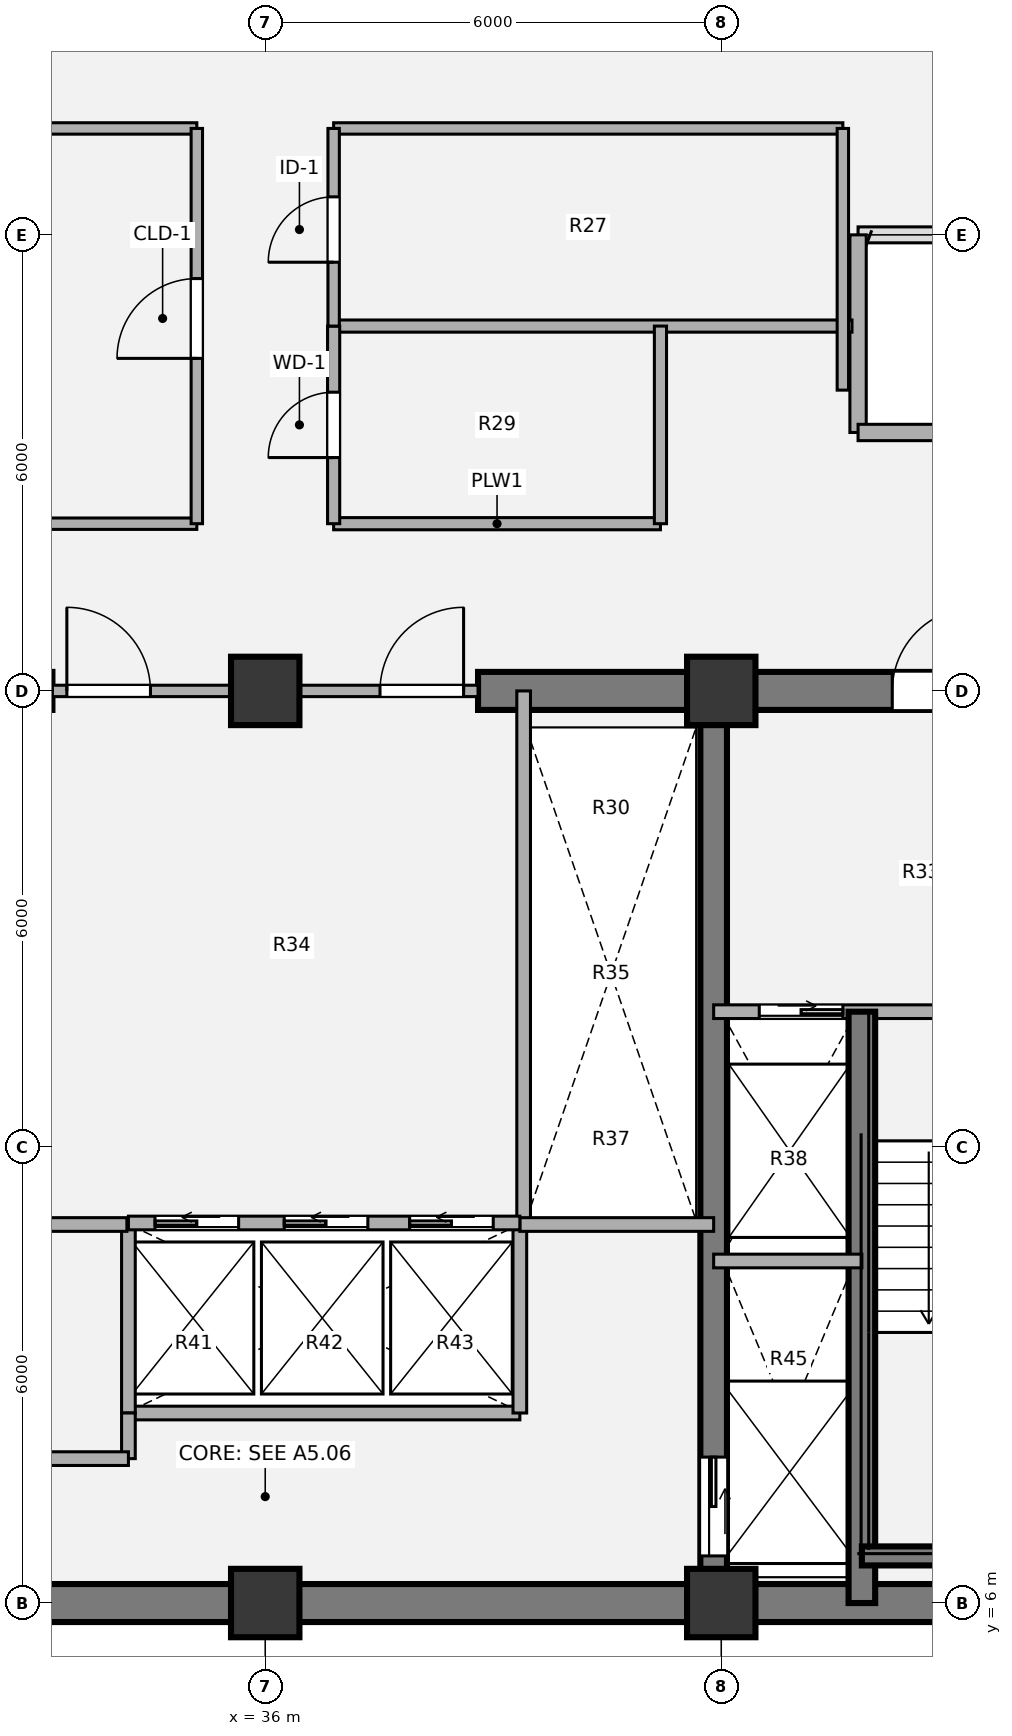
"""IFC4 building model, lengths in metres.
Left out: names, types, materials, properties, quantities, classifications, styles, units other than length and angle.
Written with IfcOpenShell. Run it as: python <this file> out.ifc"""

import sys

from ifc_helpers import new_model, si_unit, direction, frame, frame_2d, origin, origin_2d, place, context, subcontext, project, spatial, rectangle, extrude, source, transform, mapped, element, fill, save


model = new_model("IFC4")
c1 = context("Model", 3, precision=1e-05, world=origin(), true_north=direction((0.0, 1.0)))
c2 = subcontext(c1, "Body", "Model", "MODEL_VIEW")
j1 = project(units=[si_unit("LENGTHUNIT", "METRE"), si_unit("PLANEANGLEUNIT", "RADIAN")], contexts=[c1])
p1 = place(None, origin())
s1 = spatial("IfcSite", under=j1, at=p1, CompositionType="ELEMENT")
p2 = place(p1, origin())
s2 = spatial("IfcBuilding", under=s1, at=p2, CompositionType="ELEMENT")
p3 = place(p2, frame((0.0, 0.0, 127.62)))
s3 = spatial("IfcBuildingStorey", under=s2, at=p3, CompositionType="ELEMENT", Elevation=127.62)
m1 = source(origin(), c2, "Body", "SweptSolid", [
    extrude(rectangle(XDim=0.9, YDim=0.9, at=origin_2d()), origin(), (0.0, 0.0, 1.0), 3.78),
])
for number, where, z_axis, x_axis in (
    (1, (36.0, 6.0, 0.0), (0.0, 0.0, 1.0), (1.0, 0.0, 0.0)),
    (2, (42.0, 6.0, 0.0), (0.0, 0.0, 1.0), (1.0, 0.0, 0.0)),
    (3, (36.0, 18.0, 0.0), (0.0, 0.0, 1.0), (1.0, 0.0, 0.0)),
    (4, (42.0, 18.0, 0.0), (0.0, 0.0, 1.0), (1.0, 0.0, 0.0)),
):
    element("IfcColumn", number, at=place(p3, frame(where, z_axis=z_axis, x_axis=x_axis)), inside=s3, PredefinedType="COLUMN", context=c2, shape_type="MappedRepresentation", body=[
        mapped(m1, transform((0.0, 0.0, 0.0), x_axis=(1.0, 0.0, 0.0), y_axis=(0.0, 1.0, 0.0), z_axis=(0.0, 0.0, 1.0), scale=1.0)),
    ])
p4 = place(p3, frame((48.25, 6.0, 0.0), z_axis=(0.0, 0.0, 1.0), x_axis=(-1.0, 0.0, 0.0)))
e5 = element("IfcWall", 5, at=p4, inside=s3, PredefinedType="SHEAR", context=c2, shape_type="SweptSolid", body=[
    extrude(rectangle(XDim=24.5, YDim=0.5, at=frame_2d((12.25, 0.0))), origin(), (0.0, 0.0, 1.0), 3.78),
])
p5 = place(p3, frame((23.75, 18.0, 0.0), z_axis=(0.0, 0.0, 1.0), x_axis=(1.0, 0.0, 0.0)))
e6 = element("IfcWall", 6, at=p5, inside=s3, PredefinedType="SHEAR", context=c2, shape_type="SweptSolid", body=[
    extrude(rectangle(XDim=9.45, YDim=0.5, at=frame_2d((4.725, 0.0))), origin(), (0.0, 0.0, 1.0), 3.78),
])
p6 = place(p5, frame((2.95, 0.0, 0.0)))
e7 = element("IfcOpeningElement", 7, at=p6, cuts=e6, PredefinedType="OPENING", context=c2, shape_type="SweptSolid", body=[
    extrude(rectangle(XDim=1.1, YDim=2.1, at=origin_2d()), frame((0.55, 0.26, 1.05), z_axis=(0.0, -1.0, 0.0), x_axis=(1.0, 0.0, 0.0)), (0.0, 0.0, 1.0), 0.52),
])
p7 = place(p3, frame((38.8, 18.0, 0.0), z_axis=(0.0, 0.0, 1.0), x_axis=(1.0, 0.0, 0.0)))
e8 = element("IfcWall", 8, at=p7, inside=s3, PredefinedType="SHEAR", context=c2, shape_type="SweptSolid", body=[
    extrude(rectangle(XDim=9.45, YDim=0.5, at=frame_2d((4.725, 0.0))), origin(), (0.0, 0.0, 1.0), 3.78),
])
p8 = place(p7, frame((5.45, 0.0, 0.0)))
e9 = element("IfcOpeningElement", 9, at=p8, cuts=e8, PredefinedType="OPENING", context=c2, shape_type="SweptSolid", body=[
    extrude(rectangle(XDim=1.1, YDim=2.1, at=origin_2d()), frame((0.55, 0.26, 1.05), z_axis=(0.0, -1.0, 0.0), x_axis=(1.0, 0.0, 0.0)), (0.0, 0.0, 1.0), 0.52),
])
p9 = place(p3, frame((41.9, 18.0, 0.0), z_axis=(0.0, 0.0, 1.0), x_axis=(0.0, -1.0, 0.0)))
e10 = element("IfcWall", 10, at=p9, inside=s3, PredefinedType="SHEAR", context=c2, shape_type="SweptSolid", body=[
    extrude(rectangle(XDim=12.0, YDim=0.35, at=frame_2d((6.0, 0.0))), origin(), (0.0, 0.0, 1.0), 3.78),
])
p10 = place(p9, frame((10.08, 0.0, 0.0)))
e11 = element("IfcOpeningElement", 11, at=p10, cuts=e10, PredefinedType="OPENING", context=c2, shape_type="SweptSolid", body=[
    extrude(rectangle(XDim=1.3, YDim=2.1, at=origin_2d()), frame((0.65, 0.185, 1.05), z_axis=(0.0, -1.0, 0.0), x_axis=(1.0, 0.0, 0.0)), (0.0, 0.0, 1.0), 0.37),
])
p11 = place(p3, frame((43.8, 24.0, 0.0), z_axis=(0.0, 0.0, 1.0), x_axis=(0.0, -1.0, 0.0)))
e12 = element("IfcWall", 12, at=p11, inside=s3, PredefinedType="SOLIDWALL", context=c2, shape_type="SweptSolid", body=[
    extrude(rectangle(XDim=2.6, YDim=0.215, at=frame_2d((1.3, 0.0))), origin(), (0.0, 0.0, 1.0), 3.53),
])
p12 = place(p3, frame((43.8, 21.4, 0.0), z_axis=(0.0, 0.0, 1.0), x_axis=(1.0, 0.0, 0.0)))
e13 = element("IfcWall", 13, at=p12, inside=s3, PredefinedType="SOLIDWALL", context=c2, shape_type="SweptSolid", body=[
    extrude(rectangle(XDim=3.85, YDim=0.215, at=frame_2d((1.925, 0.0))), origin(), (0.0, 0.0, 1.0), 3.53),
])
p13 = place(p3, frame((34.2, 8.5, 0.0), z_axis=(0.0, 0.0, 1.0), x_axis=(1.0, 0.0, 0.0)))
e14 = element("IfcWall", 14, at=p13, inside=s3, PredefinedType="PARTITIONING", context=c2, shape_type="SweptSolid", body=[
    extrude(rectangle(XDim=5.15, YDim=0.18, at=frame_2d((2.575, 0.0))), origin(), (0.0, 0.0, 1.0), 3.5),
])
for number, where, z_axis, x_axis in (
    (15, (34.2, 8.5, 0.0), (0.0, 0.0, 1.0), (0.0, 1.0, 0.0)),
    (16, (39.35, 8.5, 0.0), (0.0, 0.0, 1.0), (0.0, 1.0, 0.0)),
):
    element("IfcWall", number, at=place(p3, frame(where, z_axis=z_axis, x_axis=x_axis)), inside=s3, PredefinedType="PARTITIONING", context=c2, shape_type="SweptSolid", body=[
        extrude(rectangle(XDim=2.5, YDim=0.18, at=frame_2d((1.25, 0.0))), origin(), (0.0, 0.0, 1.0), 3.5),
    ])
p14 = place(p3, frame((39.4, 11.0, 0.0), z_axis=(0.0, 0.0, 1.0), x_axis=(0.0, 1.0, 0.0)))
e17 = element("IfcWall", 17, at=p14, inside=s3, PredefinedType="PARTITIONING", context=c2, shape_type="SweptSolid", body=[
    extrude(rectangle(XDim=7.0, YDim=0.18, at=frame_2d((3.5, 0.0))), origin(), (0.0, 0.0, 1.0), 3.5),
])
p15 = place(p3, frame((30.1, 10.98, 0.0), z_axis=(0.0, 0.0, 1.0), x_axis=(1.0, 0.0, 0.0)))
e18 = element("IfcWall", 18, at=p15, inside=s3, PredefinedType="PARTITIONING", context=c2, shape_type="SweptSolid", body=[
    extrude(rectangle(XDim=4.08, YDim=0.18, at=frame_2d((2.04, 0.0))), origin(), (0.0, 0.0, 1.0), 3.5),
])
p16 = place(p3, frame((34.2, 7.9, 0.0), z_axis=(0.0, 0.0, 1.0), x_axis=(0.0, 1.0, 0.0)))
e19 = element("IfcWall", 19, at=p16, inside=s3, PredefinedType="PARTITIONING", context=c2, shape_type="SweptSolid", body=[
    extrude(rectangle(XDim=0.6, YDim=0.18, at=frame_2d((0.3, 0.0))), origin(), (0.0, 0.0, 1.0), 3.5),
])
p17 = place(p3, frame((32.6, 7.9, 0.0), z_axis=(0.0, 0.0, 1.0), x_axis=(1.0, 0.0, 0.0)))
e20 = element("IfcWall", 20, at=p17, inside=s3, PredefinedType="PARTITIONING", context=c2, shape_type="SweptSolid", body=[
    extrude(rectangle(XDim=1.6, YDim=0.18, at=frame_2d((0.8, 0.0))), origin(), (0.0, 0.0, 1.0), 3.5),
])
p18 = place(p3, frame((39.35, 10.98, 0.0), z_axis=(0.0, 0.0, 1.0), x_axis=(1.0, 0.0, 0.0)))
e21 = element("IfcWall", 21, at=p18, inside=s3, PredefinedType="PARTITIONING", context=c2, shape_type="SweptSolid", body=[
    extrude(rectangle(XDim=2.55, YDim=0.18, at=frame_2d((1.275, 0.0))), origin(), (0.0, 0.0, 1.0), 3.5),
])
p19 = place(p3, frame((33.2, 18.0, 0.0), z_axis=(0.0, 0.0, 1.0), x_axis=(1.0, 0.0, 0.0)))
e22 = element("IfcWall", 22, at=p19, inside=s3, PredefinedType="PARTITIONING", context=c2, shape_type="SweptSolid", body=[
    extrude(rectangle(XDim=5.6, YDim=0.15, at=frame_2d((2.8, 0.0))), origin(), (0.0, 0.0, 1.0), 2.315),
])
p20 = place(p19, frame((0.19, 0.0, 0.0)))
e23 = element("IfcOpeningElement", 23, at=p20, cuts=e22, PredefinedType="OPENING", context=c2, shape_type="SweptSolid", body=[
    extrude(rectangle(XDim=1.1, YDim=2.1, at=origin_2d()), frame((0.55, 0.085, 1.05), z_axis=(0.0, -1.0, 0.0), x_axis=(1.0, 0.0, 0.0)), (0.0, 0.0, 1.0), 0.17),
])
p21 = place(p19, frame((4.31, 0.0, 0.0)))
e24 = element("IfcOpeningElement", 24, at=p21, cuts=e22, PredefinedType="OPENING", context=c2, shape_type="SweptSolid", body=[
    extrude(rectangle(XDim=1.1, YDim=2.1, at=origin_2d()), frame((0.55, 0.085, 1.05), z_axis=(0.0, -1.0, 0.0), x_axis=(1.0, 0.0, 0.0)), (0.0, 0.0, 1.0), 0.17),
])
p22 = place(p3, frame((41.9, 13.78, 0.0), z_axis=(0.0, 0.0, 1.0), x_axis=(1.0, 0.0, 0.0)))
e25 = element("IfcWall", 25, at=p22, inside=s3, PredefinedType="PARTITIONING", context=c2, shape_type="SweptSolid", body=[
    extrude(rectangle(XDim=6.1, YDim=0.18, at=frame_2d((3.05, 0.0))), origin(), (0.0, 0.0, 1.0), 3.5),
])
p23 = place(p22, frame((0.6, 0.0, 0.0)))
e26 = element("IfcOpeningElement", 26, at=p23, cuts=e25, PredefinedType="OPENING", context=c2, shape_type="SweptSolid", body=[
    extrude(rectangle(XDim=1.1, YDim=2.1, at=origin_2d()), frame((0.55, 0.1, 1.05), z_axis=(0.0, -1.0, 0.0), x_axis=(1.0, 0.0, 0.0)), (0.0, 0.0, 1.0), 0.2),
])
p24 = place(p22, frame((3.8, 0.0, 0.0)))
e27 = element("IfcOpeningElement", 27, at=p24, cuts=e25, PredefinedType="OPENING", context=c2, shape_type="SweptSolid", body=[
    extrude(rectangle(XDim=1.1, YDim=2.1, at=origin_2d()), frame((0.55, 0.1, 1.05), z_axis=(0.0, -1.0, 0.0), x_axis=(1.0, 0.0, 0.0)), (0.0, 0.0, 1.0), 0.2),
])
p25 = place(p3, frame((43.85, 6.0, 0.0), z_axis=(0.0, 0.0, 1.0), x_axis=(0.0, 1.0, 0.0)))
e28 = element("IfcWall", 28, at=p25, inside=s3, PredefinedType="SHEAR", context=c2, shape_type="SweptSolid", body=[
    extrude(rectangle(XDim=7.78, YDim=0.35, at=frame_2d((3.89, 0.0))), origin(), (0.0, 0.0, 1.0), 3.85),
])
p26 = place(p3, frame((43.85, 6.62, 0.0), z_axis=(0.0, 0.0, 1.0), x_axis=(1.0, 0.0, 0.0)))
e29 = element("IfcWall", 29, at=p26, inside=s3, PredefinedType="SHEAR", context=c2, shape_type="SweptSolid", body=[
    extrude(rectangle(XDim=3.57, YDim=0.25, at=frame_2d((1.785, 0.0))), origin(), (0.0, 0.0, 1.0), 3.85),
])
p27 = place(p3, frame((41.9, 10.5, 0.0), z_axis=(0.0, 0.0, 1.0), x_axis=(1.0, 0.0, 0.0)))
e30 = element("IfcWall", 30, at=p27, inside=s3, PredefinedType="PARTITIONING", context=c2, shape_type="SweptSolid", body=[
    extrude(rectangle(XDim=1.95, YDim=0.18, at=frame_2d((0.975, 0.0))), origin(), (0.0, 0.0, 1.0), 3.5),
])
p28 = place(p3, frame((34.2, 11.0, 0.0), z_axis=(0.0, 0.0, 1.0), x_axis=(1.0, 0.0, 0.0)))
e31 = element("IfcWall", 31, at=p28, inside=s3, PredefinedType="PARTITIONING", context=c2, shape_type="SweptSolid", body=[
    extrude(rectangle(XDim=5.15, YDim=0.18, at=frame_2d((2.575, 0.0))), origin(), (0.0, 0.0, 1.0), 3.5),
])
p29 = place(p28, frame((0.35, 0.0, 0.0)))
e32 = element("IfcOpeningElement", 32, at=p29, cuts=e31, PredefinedType="OPENING", context=c2, shape_type="SweptSolid", body=[
    extrude(rectangle(XDim=1.1, YDim=2.1, at=origin_2d()), frame((0.55, 0.1, 1.05), z_axis=(0.0, -1.0, 0.0), x_axis=(1.0, 0.0, 0.0)), (0.0, 0.0, 1.0), 0.2),
])
p30 = place(p28, frame((2.05, 0.0, 0.0)))
e33 = element("IfcOpeningElement", 33, at=p30, cuts=e31, PredefinedType="OPENING", context=c2, shape_type="SweptSolid", body=[
    extrude(rectangle(XDim=1.1, YDim=2.1, at=origin_2d()), frame((0.55, 0.1, 1.05), z_axis=(0.0, -1.0, 0.0), x_axis=(1.0, 0.0, 0.0)), (0.0, 0.0, 1.0), 0.2),
])
p31 = place(p28, frame((3.7, 0.0, 0.0)))
e34 = element("IfcOpeningElement", 34, at=p31, cuts=e31, PredefinedType="OPENING", context=c2, shape_type="SweptSolid", body=[
    extrude(rectangle(XDim=1.1, YDim=2.1, at=origin_2d()), frame((0.55, 0.1, 1.05), z_axis=(0.0, -1.0, 0.0), x_axis=(1.0, 0.0, 0.0)), (0.0, 0.0, 1.0), 0.2),
])
p32 = place(p3, frame((28.4, 20.2, 0.0), z_axis=(0.0, 0.0, 1.0), x_axis=(1.0, 0.0, 0.0)))
e35 = element("IfcWall", 35, at=p32, inside=s3, PredefinedType="PARTITIONING", context=c2, shape_type="SweptSolid", body=[
    extrude(rectangle(XDim=6.7, YDim=0.15, at=frame_2d((3.35, 0.0))), origin(), (0.0, 0.0, 1.0), 3.5),
])
p33 = place(p3, frame((36.9, 20.2, 0.0), z_axis=(0.0, 0.0, 1.0), x_axis=(1.0, 0.0, 0.0)))
e36 = element("IfcWall", 36, at=p33, inside=s3, PredefinedType="PLUMBINGWALL", context=c2, shape_type="SweptSolid", body=[
    extrude(rectangle(XDim=4.3, YDim=0.16, at=frame_2d((2.15, 0.0))), origin(), (0.0, 0.0, 1.0), 3.5),
])
p34 = place(p3, frame((36.9, 22.8, 0.0), z_axis=(0.0, 0.0, 1.0), x_axis=(1.0, 0.0, 0.0)))
e37 = element("IfcWall", 37, at=p34, inside=s3, PredefinedType="PLUMBINGWALL", context=c2, shape_type="SweptSolid", body=[
    extrude(rectangle(XDim=6.82, YDim=0.16, at=frame_2d((3.41, 0.0))), origin(), (0.0, 0.0, 1.0), 3.5),
])
for number, where, z_axis, x_axis in (
    (38, (28.4, 25.4, 0.0), (0.0, 0.0, 1.0), (1.0, 0.0, 0.0)),
    (39, (36.9, 25.4, 0.0), (0.0, 0.0, 1.0), (1.0, 0.0, 0.0)),
):
    element("IfcWall", number, at=place(p3, frame(where, z_axis=z_axis, x_axis=x_axis)), inside=s3, PredefinedType="PARTITIONING", context=c2, shape_type="SweptSolid", body=[
        extrude(rectangle(XDim=6.7, YDim=0.15, at=frame_2d((3.35, 0.0))), origin(), (0.0, 0.0, 1.0), 3.5),
    ])
p35 = place(p3, frame((35.1, 20.2, 0.0), z_axis=(0.0, 0.0, 1.0), x_axis=(0.0, 1.0, 0.0)))
e40 = element("IfcWall", 40, at=p35, inside=s3, PredefinedType="PARTITIONING", context=c2, shape_type="SweptSolid", body=[
    extrude(rectangle(XDim=5.2, YDim=0.15, at=frame_2d((2.6, 0.0))), origin(), (0.0, 0.0, 1.0), 3.5),
])
p36 = place(p35, frame((2.175, 0.0, 0.0)))
e41 = element("IfcOpeningElement", 41, at=p36, cuts=e40, PredefinedType="OPENING", context=c2, shape_type="SweptSolid", body=[
    extrude(rectangle(XDim=1.05, YDim=2.1, at=origin_2d()), frame((0.525, 0.085, 1.05), z_axis=(0.0, -1.0, 0.0), x_axis=(1.0, 0.0, 0.0)), (0.0, 0.0, 1.0), 0.17),
])
p37 = place(p3, frame((36.9, 20.2, 0.0), z_axis=(0.0, 0.0, 1.0), x_axis=(0.0, 1.0, 0.0)))
e42 = element("IfcWall", 42, at=p37, inside=s3, PredefinedType="PLUMBINGWALL", context=c2, shape_type="SweptSolid", body=[
    extrude(rectangle(XDim=2.6, YDim=0.16, at=frame_2d((1.3, 0.0))), origin(), (0.0, 0.0, 1.0), 3.5),
])
p38 = place(p37, frame((0.87, 0.0, 0.0)))
e43 = element("IfcOpeningElement", 43, at=p38, cuts=e42, PredefinedType="OPENING", context=c2, shape_type="SweptSolid", body=[
    extrude(rectangle(XDim=0.86, YDim=2.1, at=origin_2d()), frame((0.43, 0.09, 1.05), z_axis=(0.0, -1.0, 0.0), x_axis=(1.0, 0.0, 0.0)), (0.0, 0.0, 1.0), 0.18),
])
p39 = place(p3, frame((36.9, 22.8, 0.0), z_axis=(0.0, 0.0, 1.0), x_axis=(0.0, 1.0, 0.0)))
e44 = element("IfcWall", 44, at=p39, inside=s3, PredefinedType="PARTITIONING", context=c2, shape_type="SweptSolid", body=[
    extrude(rectangle(XDim=2.6, YDim=0.15, at=frame_2d((1.3, 0.0))), origin(), (0.0, 0.0, 1.0), 3.5),
])
p40 = place(p39, frame((0.84, 0.0, 0.0)))
e45 = element("IfcOpeningElement", 45, at=p40, cuts=e44, PredefinedType="OPENING", context=c2, shape_type="SweptSolid", body=[
    extrude(rectangle(XDim=0.86, YDim=2.1, at=origin_2d()), frame((0.43, 0.085, 1.05), z_axis=(0.0, -1.0, 0.0), x_axis=(1.0, 0.0, 0.0)), (0.0, 0.0, 1.0), 0.17),
])
p41 = place(p3, frame((41.2, 20.2, 0.0), z_axis=(0.0, 0.0, 1.0), x_axis=(0.0, 1.0, 0.0)))
e46 = element("IfcWall", 46, at=p41, inside=s3, PredefinedType="PLUMBINGWALL", context=c2, shape_type="SweptSolid", body=[
    extrude(rectangle(XDim=2.6, YDim=0.16, at=frame_2d((1.3, 0.0))), origin(), (0.0, 0.0, 1.0), 2.815),
])
p42 = place(p3, frame((43.6, 21.958, 0.0), z_axis=(0.0, 0.0, 1.0), x_axis=(0.0, 1.0, 0.0)))
e47 = element("IfcWall", 47, at=p42, inside=s3, PredefinedType="PARTITIONING", context=c2, shape_type="SweptSolid", body=[
    extrude(rectangle(XDim=3.442, YDim=0.15, at=frame_2d((1.721, 0.0))), origin(), (0.0, 0.0, 1.0), 3.5),
])
m2 = source(origin(), c2, "Body", "SweptSolid", [
    extrude(rectangle(XDim=1.1, YDim=2.1, at=origin_2d()), frame((0.55, 0.025, 1.05), z_axis=(0.0, -1.0, 0.0), x_axis=(1.0, 0.0, 0.0)), (0.0, 0.0, 1.0), 0.05),
])
p43 = place(p20, origin())
e48 = element("IfcDoor", 48, at=p43, inside=s3, OperationType="SINGLE_SWING_LEFT", PredefinedType="DOOR", context=c2, shape_type="MappedRepresentation", body=[
    mapped(m2, transform((0.0, 0.0, 0.0), x_axis=(1.0, 0.0, 0.0), y_axis=(0.0, 1.0, 0.0), z_axis=(0.0, 0.0, 1.0), scale=1.0)),
])
fill(e23, e48)
p44 = place(p21, origin())
e49 = element("IfcDoor", 49, at=p44, inside=s3, OperationType="SINGLE_SWING_RIGHT", PredefinedType="DOOR", context=c2, shape_type="MappedRepresentation", body=[
    mapped(m2, transform((0.0, 0.0, 0.0), x_axis=(1.0, 0.0, 0.0), y_axis=(0.0, 1.0, 0.0), z_axis=(0.0, 0.0, 1.0), scale=1.0)),
])
fill(e24, e49)
m3 = source(origin(), c2, "Body", "SweptSolid", [
    extrude(rectangle(XDim=1.1, YDim=2.1, at=origin_2d()), frame((0.55, 0.025, 1.05), z_axis=(0.0, -1.0, 0.0), x_axis=(1.0, 0.0, 0.0)), (0.0, 0.0, 1.0), 0.05),
])
p45 = place(p23, origin())
e50 = element("IfcDoor", 50, at=p45, inside=s3, OperationType="SLIDING_TO_RIGHT", PredefinedType="DOOR", context=c2, shape_type="MappedRepresentation", body=[
    mapped(m3, transform((0.0, 0.0, 0.0), x_axis=(1.0, 0.0, 0.0), y_axis=(0.0, 1.0, 0.0), z_axis=(0.0, 0.0, 1.0), scale=1.0)),
])
fill(e26, e50)
m4 = source(origin(), c2, "Body", "SweptSolid", [
    extrude(rectangle(XDim=1.3, YDim=2.1, at=origin_2d()), frame((0.65, 0.025, 1.05), z_axis=(0.0, -1.0, 0.0), x_axis=(1.0, 0.0, 0.0)), (0.0, 0.0, 1.0), 0.05),
])
p46 = place(p10, origin())
e51 = element("IfcDoor", 51, at=p46, inside=s3, OperationType="SLIDING_TO_LEFT", PredefinedType="DOOR", context=c2, shape_type="MappedRepresentation", body=[
    mapped(m4, transform((0.0, 0.0, 0.0), x_axis=(1.0, 0.0, 0.0), y_axis=(0.0, 1.0, 0.0), z_axis=(0.0, 0.0, 1.0), scale=1.0)),
])
fill(e11, e51)
p47 = place(p8, origin())
e52 = element("IfcDoor", 52, at=p47, inside=s3, OperationType="SINGLE_SWING_RIGHT", PredefinedType="DOOR", context=c2, shape_type="MappedRepresentation", body=[
    mapped(m2, transform((0.0, 0.0, 0.0), x_axis=(1.0, 0.0, 0.0), y_axis=(0.0, 1.0, 0.0), z_axis=(0.0, 0.0, 1.0), scale=1.0)),
])
fill(e9, e52)
p48 = place(p29, origin())
e53 = element("IfcDoor", 53, at=p48, inside=s3, OperationType="SLIDING_TO_LEFT", PredefinedType="DOOR", context=c2, shape_type="MappedRepresentation", body=[
    mapped(m3, transform((0.0, 0.0, 0.0), x_axis=(1.0, 0.0, 0.0), y_axis=(0.0, 1.0, 0.0), z_axis=(0.0, 0.0, 1.0), scale=1.0)),
])
fill(e32, e53)
p49 = place(p30, origin())
e54 = element("IfcDoor", 54, at=p49, inside=s3, OperationType="SLIDING_TO_LEFT", PredefinedType="DOOR", context=c2, shape_type="MappedRepresentation", body=[
    mapped(m3, transform((0.0, 0.0, 0.0), x_axis=(1.0, 0.0, 0.0), y_axis=(0.0, 1.0, 0.0), z_axis=(0.0, 0.0, 1.0), scale=1.0)),
])
fill(e33, e54)
p50 = place(p31, origin())
e55 = element("IfcDoor", 55, at=p50, inside=s3, OperationType="SLIDING_TO_LEFT", PredefinedType="DOOR", context=c2, shape_type="MappedRepresentation", body=[
    mapped(m3, transform((0.0, 0.0, 0.0), x_axis=(1.0, 0.0, 0.0), y_axis=(0.0, 1.0, 0.0), z_axis=(0.0, 0.0, 1.0), scale=1.0)),
])
fill(e34, e55)
m5 = source(origin(), c2, "Body", "SweptSolid", [
    extrude(rectangle(XDim=1.05, YDim=2.1, at=origin_2d()), frame((0.525, 0.025, 1.05), z_axis=(0.0, -1.0, 0.0), x_axis=(1.0, 0.0, 0.0)), (0.0, 0.0, 1.0), 0.05),
])
p51 = place(p36, origin())
e56 = element("IfcDoor", 56, at=p51, inside=s3, OperationType="SINGLE_SWING_LEFT", PredefinedType="DOOR", context=c2, shape_type="MappedRepresentation", body=[
    mapped(m5, transform((0.0, 0.0, 0.0), x_axis=(1.0, 0.0, 0.0), y_axis=(0.0, 1.0, 0.0), z_axis=(0.0, 0.0, 1.0), scale=1.0)),
])
fill(e41, e56)
m6 = source(origin(), c2, "Body", "SweptSolid", [
    extrude(rectangle(XDim=0.86, YDim=2.1, at=origin_2d()), frame((0.43, 0.025, 1.05), z_axis=(0.0, -1.0, 0.0), x_axis=(1.0, 0.0, 0.0)), (0.0, 0.0, 1.0), 0.05),
])
p52 = place(p38, origin())
e57 = element("IfcDoor", 57, at=p52, inside=s3, OperationType="SINGLE_SWING_LEFT", PredefinedType="DOOR", context=c2, shape_type="MappedRepresentation", body=[
    mapped(m6, transform((0.0, 0.0, 0.0), x_axis=(1.0, 0.0, 0.0), y_axis=(0.0, 1.0, 0.0), z_axis=(0.0, 0.0, 1.0), scale=1.0)),
])
fill(e43, e57)
m7 = source(origin(), c2, "Body", "SweptSolid", [
    extrude(rectangle(XDim=0.86, YDim=2.1, at=origin_2d()), frame((0.43, 0.025, 1.05), z_axis=(0.0, -1.0, 0.0), x_axis=(1.0, 0.0, 0.0)), (0.0, 0.0, 1.0), 0.05),
])
p53 = place(p40, origin())
e58 = element("IfcDoor", 58, at=p53, inside=s3, OperationType="SINGLE_SWING_LEFT", PredefinedType="DOOR", context=c2, shape_type="MappedRepresentation", body=[
    mapped(m7, transform((0.0, 0.0, 0.0), x_axis=(1.0, 0.0, 0.0), y_axis=(0.0, 1.0, 0.0), z_axis=(0.0, 0.0, 1.0), scale=1.0)),
])
fill(e45, e58)
save(model, sys.argv[1])
